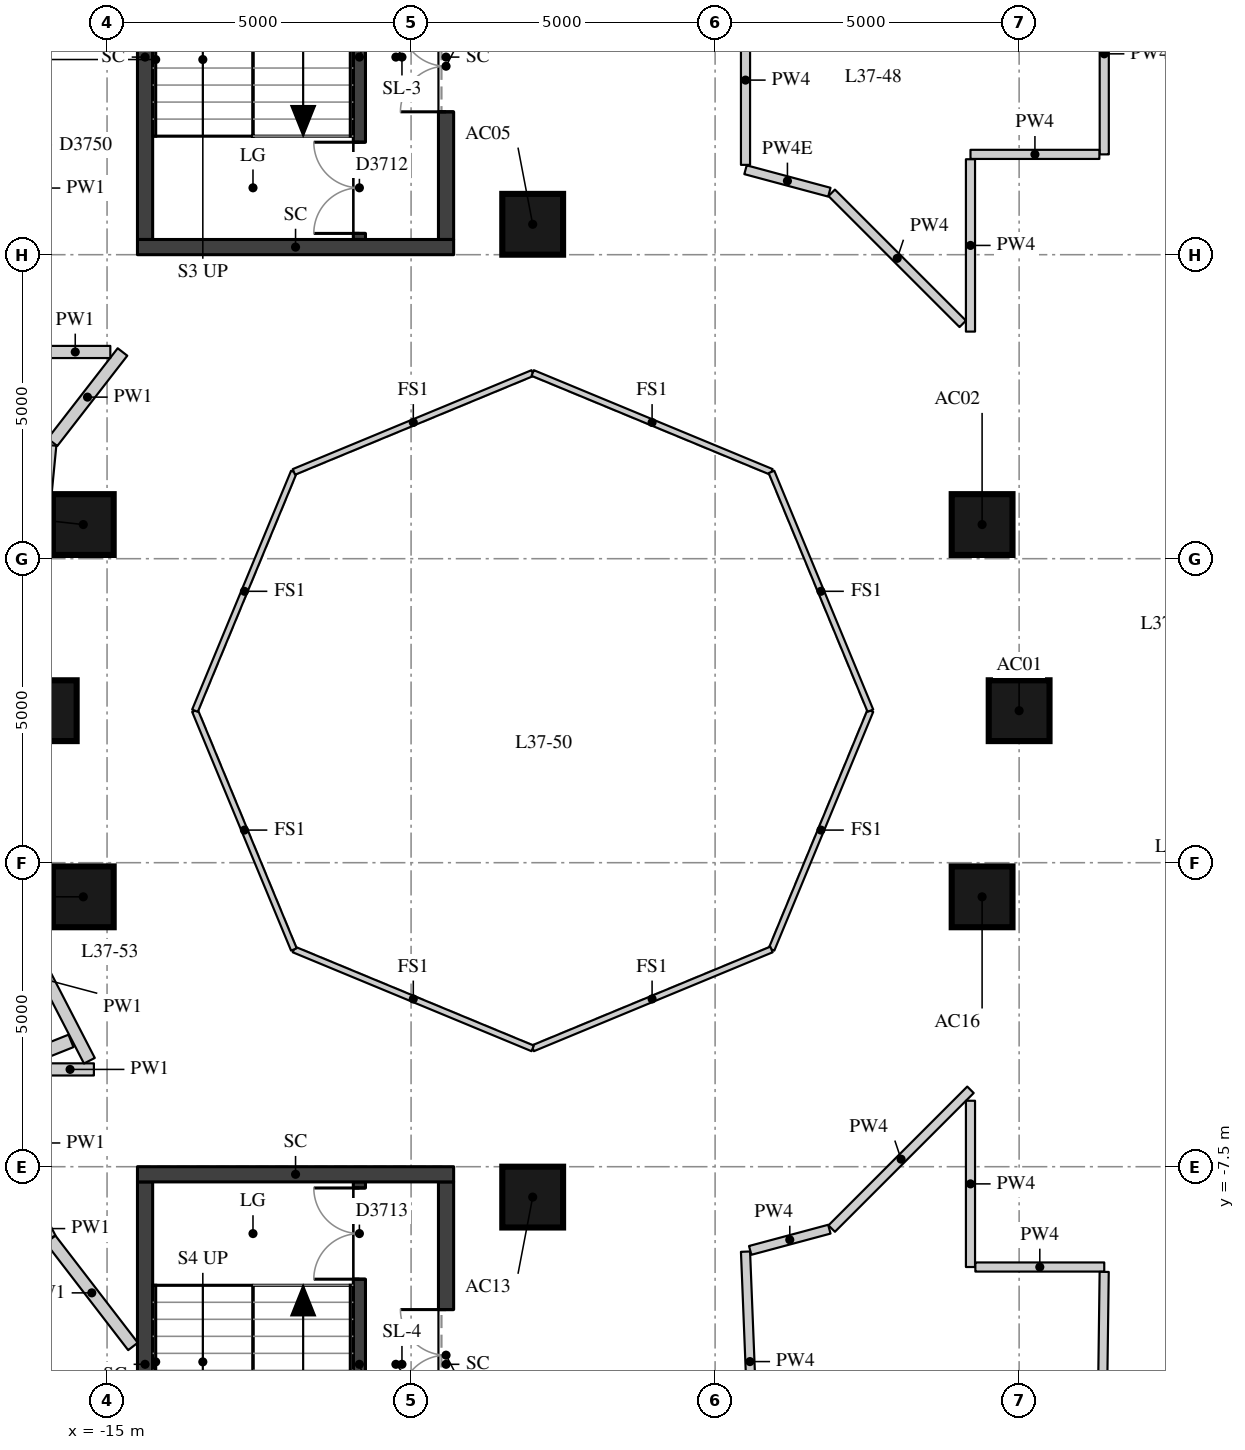
"""IFC4 building model, lengths in metres.
Left out: names, types, materials, properties, quantities, classifications, styles, units other than length and angle.
Written with IfcOpenShell. Run it as: python <this file> out.ifc"""

import sys

from ifc_helpers import new_model, si_unit, direction, frame, frame_2d, origin, origin_2d, place, context, subcontext, project, spatial, rectangle, extrude, element, fill, save


model = new_model("IFC4")
c1 = context("Model", 3, precision=1e-05, world=origin(), true_north=direction((0.0, 1.0)))
c2 = subcontext(c1, "Body", "Model", "MODEL_VIEW")
j1 = project(units=[si_unit("LENGTHUNIT", "METRE"), si_unit("PLANEANGLEUNIT", "RADIAN")], contexts=[c1])
p1 = place(None, origin())
s1 = spatial("IfcSite", under=j1, at=p1, CompositionType="ELEMENT")
p2 = place(p1, origin())
s2 = spatial("IfcBuilding", under=s1, at=p2, CompositionType="ELEMENT")
p3 = place(p2, frame((0.0, 0.0, 131.8)))
s3 = spatial("IfcBuildingStorey", under=s2, at=p3, CompositionType="ELEMENT", Elevation=131.8)
for number, where, z_axis, x_axis in (
    (1, (0.0, 0.0, 0.0), (0.0, 0.0, 1.0), (1.0, 0.0, 0.0)),
    (2, (-0.609, 3.062, 0.0), (0.0, 0.0, 1.0), (1.0, 0.0, 0.0)),
    (3, (-8.0, 8.0, 0.0), (0.0, 0.0, 1.0), (1.0, 0.0, 0.0)),
    (4, (-15.391, 3.062, 0.0), (0.0, 0.0, 1.0), (1.0, 0.0, 0.0)),
    (5, (-16.0, 0.0, 0.0), (0.0, 0.0, 1.0), (1.0, 0.0, 0.0)),
    (6, (-15.391, -3.062, 0.0), (0.0, 0.0, 1.0), (1.0, 0.0, 0.0)),
    (7, (-8.0, -8.0, 0.0), (0.0, 0.0, 1.0), (1.0, 0.0, 0.0)),
    (8, (-0.609, -3.062, 0.0), (0.0, 0.0, 1.0), (1.0, 0.0, 0.0)),
):
    element("IfcColumn", number, at=place(p3, frame(where, z_axis=z_axis, x_axis=x_axis)), inside=s3, PredefinedType="COLUMN", context=c2, shape_type="SweptSolid", body=[
        extrude(rectangle(XDim=1.0, YDim=1.0, at=origin_2d()), origin(), (0.0, 0.0, 1.0), 3.3),
    ])
p4 = place(p3, frame((-10.85, 7.75, 0.0), z_axis=(0.0, 0.0, 1.0), x_axis=(0.0, 1.0, 0.0)))
e9 = element("IfcWall", 9, at=p4, inside=s3, PredefinedType="SHEAR", context=c2, shape_type="SweptSolid", body=[
    extrude(rectangle(XDim=6.0, YDim=0.2, at=frame_2d((3.0, 0.0))), origin(), (0.0, 0.0, 1.0), 2.85),
])
p5 = place(p4, frame((0.1, 0.0, 0.0)))
e10 = element("IfcOpeningElement", 10, at=p5, cuts=e9, PredefinedType="OPENING", context=c2, shape_type="SweptSolid", body=[
    extrude(rectangle(XDim=1.5, YDim=2.1, at=frame_2d((0.75, 1.05))), frame((0.0, 0.11, 0.0), z_axis=(0.0, -1.0, 0.0), x_axis=(1.0, 0.0, 0.0)), (0.0, 0.0, 1.0), 0.22),
])
p6 = place(p3, frame((-10.85, -13.75, 0.0), z_axis=(0.0, 0.0, 1.0), x_axis=(0.0, 1.0, 0.0)))
e11 = element("IfcWall", 11, at=p6, inside=s3, PredefinedType="SHEAR", context=c2, shape_type="SweptSolid", body=[
    extrude(rectangle(XDim=6.0, YDim=0.2, at=frame_2d((3.0, 0.0))), origin(), (0.0, 0.0, 1.0), 2.85),
])
p7 = place(p6, frame((4.4, 0.0, 0.0)))
e12 = element("IfcOpeningElement", 12, at=p7, cuts=e11, PredefinedType="OPENING", context=c2, shape_type="SweptSolid", body=[
    extrude(rectangle(XDim=1.5, YDim=2.1, at=frame_2d((0.75, 1.05))), frame((0.0, 0.11, 0.0), z_axis=(0.0, -1.0, 0.0), x_axis=(1.0, 0.0, 0.0)), (0.0, 0.0, 1.0), 0.22),
])
p8 = place(p3, frame((-14.375, 7.75, -0.28), z_axis=(0.0, 0.0, 1.0), x_axis=(0.0, 1.0, 0.0)))
e13 = element("IfcWall", 13, at=p8, inside=s3, PredefinedType="SHEAR", context=c2, shape_type="SweptSolid", body=[
    extrude(rectangle(XDim=6.0, YDim=0.25, at=frame_2d((3.0, 0.0))), origin(), (0.0, 0.0, 1.0), 3.13),
])
p9 = place(p3, frame((-9.425, 7.75, -0.28), z_axis=(0.0, 0.0, 1.0), x_axis=(0.0, 1.0, 0.0)))
e14 = element("IfcWall", 14, at=p9, inside=s3, PredefinedType="SHEAR", context=c2, shape_type="SweptSolid", body=[
    extrude(rectangle(XDim=6.0, YDim=0.25, at=frame_2d((3.0, 0.0))), origin(), (0.0, 0.0, 1.0), 3.13),
])
p10 = place(p9, frame((2.1, 0.0, 0.28)))
e15 = element("IfcOpeningElement", 15, at=p10, cuts=e14, PredefinedType="OPENING", context=c2, shape_type="SweptSolid", body=[
    extrude(rectangle(XDim=1.5, YDim=2.1, at=frame_2d((0.75, 1.05))), frame((0.0, 0.135, 0.0), z_axis=(0.0, -1.0, 0.0), x_axis=(1.0, 0.0, 0.0)), (0.0, 0.0, 1.0), 0.27),
])
p11 = place(p3, frame((-14.5, 7.625, -0.28), z_axis=(0.0, 0.0, 1.0), x_axis=(1.0, 0.0, 0.0)))
e16 = element("IfcWall", 16, at=p11, inside=s3, PredefinedType="SHEAR", context=c2, shape_type="SweptSolid", body=[
    extrude(rectangle(XDim=5.2, YDim=0.25, at=frame_2d((2.6, 0.0))), origin(), (0.0, 0.0, 1.0), 3.13),
])
p12 = place(p3, frame((-14.375, -13.75, -0.28), z_axis=(0.0, 0.0, 1.0), x_axis=(0.0, 1.0, 0.0)))
e17 = element("IfcWall", 17, at=p12, inside=s3, PredefinedType="SHEAR", context=c2, shape_type="SweptSolid", body=[
    extrude(rectangle(XDim=6.0, YDim=0.25, at=frame_2d((3.0, 0.0))), origin(), (0.0, 0.0, 1.0), 3.13),
])
p13 = place(p3, frame((-9.425, -13.75, -0.28), z_axis=(0.0, 0.0, 1.0), x_axis=(0.0, 1.0, 0.0)))
e18 = element("IfcWall", 18, at=p13, inside=s3, PredefinedType="SHEAR", context=c2, shape_type="SweptSolid", body=[
    extrude(rectangle(XDim=6.0, YDim=0.25, at=frame_2d((3.0, 0.0))), origin(), (0.0, 0.0, 1.0), 3.13),
])
p14 = place(p13, frame((2.4, 0.0, 0.28)))
e19 = element("IfcOpeningElement", 19, at=p14, cuts=e18, PredefinedType="OPENING", context=c2, shape_type="SweptSolid", body=[
    extrude(rectangle(XDim=1.5, YDim=2.1, at=frame_2d((0.75, 1.05))), frame((0.0, 0.135, 0.0), z_axis=(0.0, -1.0, 0.0), x_axis=(1.0, 0.0, 0.0)), (0.0, 0.0, 1.0), 0.27),
])
p15 = place(p3, frame((-14.5, -7.625, -0.28), z_axis=(0.0, 0.0, 1.0), x_axis=(1.0, 0.0, 0.0)))
e20 = element("IfcWall", 20, at=p15, inside=s3, PredefinedType="SHEAR", context=c2, shape_type="SweptSolid", body=[
    extrude(rectangle(XDim=5.2, YDim=0.25, at=frame_2d((2.6, 0.0))), origin(), (0.0, 0.0, 1.0), 3.13),
])
p16 = place(p3, frame((-14.573, -10.456, 0.0), z_axis=(0.0, 0.0, 1.0), x_axis=(-0.60967360535, 0.792652568872, 0.0)))
e21 = element("IfcWall", 21, at=p16, inside=s3, PredefinedType="PARTITIONING", context=c2, shape_type="SweptSolid", body=[
    extrude(rectangle(XDim=2.223, YDim=0.2, at=frame_2d((1.111, 0.0))), origin(), (0.0, 0.0, 1.0), 2.85),
])
p17 = place(p3, frame((-15.938, -8.676, 0.0), z_axis=(0.0, 0.0, 1.0), x_axis=(-0.456525695549, 0.889710227717, 0.0)))
e22 = element("IfcWall", 22, at=p17, inside=s3, PredefinedType="PARTITIONING", context=c2, shape_type="SweptSolid", body=[
    extrude(rectangle(XDim=0.356, YDim=0.2, at=frame_2d((0.178, 0.0))), origin(), (0.0, 0.0, 1.0), 2.85),
])
p18 = place(p3, frame((-16.0, -5.9, 0.0), z_axis=(0.0, 0.0, 1.0), x_axis=(1.0, 0.0, 0.0)))
e23 = element("IfcWall", 23, at=p18, inside=s3, PredefinedType="PARTITIONING", context=c2, shape_type="SweptSolid", body=[
    extrude(rectangle(XDim=0.784, YDim=0.2, at=frame_2d((0.392, 0.0))), origin(), (0.0, 0.0, 1.0), 2.85),
])
p19 = place(p3, frame((-15.291, -5.757, 0.0), z_axis=(0.0, 0.0, 1.0), x_axis=(-0.45873256191, 0.888574384418, 0.0)))
e24 = element("IfcWall", 24, at=p19, inside=s3, PredefinedType="PARTITIONING", context=c2, shape_type="SweptSolid", body=[
    extrude(rectangle(XDim=2.983, YDim=0.2, at=frame_2d((1.491, 0.0))), origin(), (0.0, 0.0, 1.0), 2.85),
])
p20 = place(p3, frame((-16.653, -3.047, 0.0), z_axis=(0.0, 0.0, 1.0), x_axis=(0.096559879606, 0.995327177189, 0.0)))
e25 = element("IfcWall", 25, at=p20, inside=s3, PredefinedType="PARTITIONING", context=c2, shape_type="SweptSolid", body=[
    extrude(rectangle(XDim=7.449, YDim=0.2, at=frame_2d((3.724, 0.0))), origin(), (0.0, 0.0, 1.0), 2.35),
])
p21 = place(p20, frame((0.864, 0.0, 0.0)))
e26 = element("IfcOpeningElement", 26, at=p21, cuts=e25, PredefinedType="OPENING", context=c2, shape_type="SweptSolid", body=[
    extrude(rectangle(XDim=1.1, YDim=2.1, at=frame_2d((0.55, 1.05))), frame((0.0, 0.11, 0.0), z_axis=(0.0, -1.0, 0.0), x_axis=(1.0, 0.0, 0.0)), (0.0, 0.0, 1.0), 0.22),
])
p22 = place(p3, frame((-15.897, 4.415, 0.0), z_axis=(0.0, 0.0, 1.0), x_axis=(0.612626457361, 0.790372585393, 0.0)))
e27 = element("IfcWall", 27, at=p22, inside=s3, PredefinedType="PARTITIONING", context=c2, shape_type="SweptSolid", body=[
    extrude(rectangle(XDim=1.879, YDim=0.2, at=frame_2d((0.939, 0.0))), origin(), (0.0, 0.0, 1.0), 2.85),
])
p23 = place(p3, frame((-14.946, 5.9, 0.0), z_axis=(0.0, 0.0, 1.0), x_axis=(-1.0, 0.0, 0.0)))
e28 = element("IfcWall", 28, at=p23, inside=s3, PredefinedType="PARTITIONING", context=c2, shape_type="SweptSolid", body=[
    extrude(rectangle(XDim=1.154, YDim=0.2, at=frame_2d((0.577, 0.0))), origin(), (0.0, 0.0, 1.0), 2.85),
])
p24 = place(p3, frame((1.4, 12.457, 0.0), z_axis=(0.0, 0.0, 1.0), x_axis=(0.0, -1.0, 0.0)))
e29 = element("IfcWall", 29, at=p24, inside=s3, PredefinedType="PARTITIONING", context=c2, shape_type="SweptSolid", body=[
    extrude(rectangle(XDim=3.307, YDim=0.15, at=frame_2d((1.654, 0.0))), origin(), (0.0, 0.0, 1.0), 2.85),
])
p25 = place(p3, frame((1.32, 9.15, 0.0), z_axis=(0.0, 0.0, 1.0), x_axis=(-1.0, 0.0, 0.0)))
e30 = element("IfcWall", 30, at=p25, inside=s3, PredefinedType="PARTITIONING", context=c2, shape_type="SweptSolid", body=[
    extrude(rectangle(XDim=2.12, YDim=0.15, at=frame_2d((1.06, 0.0))), origin(), (0.0, 0.0, 1.0), 2.85),
])
p26 = place(p3, frame((-0.8, 9.07, 0.0), z_axis=(0.0, 0.0, 1.0), x_axis=(0.0, -1.0, 0.0)))
e31 = element("IfcWall", 31, at=p26, inside=s3, PredefinedType="PARTITIONING", context=c2, shape_type="SweptSolid", body=[
    extrude(rectangle(XDim=2.835, YDim=0.15, at=frame_2d((1.417, 0.0))), origin(), (0.0, 0.0, 1.0), 2.85),
])
p27 = place(p3, frame((-0.927, 6.363, 0.0), z_axis=(0.0, 0.0, 1.0), x_axis=(-0.707106781187, 0.707106781187, 0.0)))
e32 = element("IfcWall", 32, at=p27, inside=s3, PredefinedType="PARTITIONING", context=c2, shape_type="SweptSolid", body=[
    extrude(rectangle(XDim=3.048, YDim=0.15, at=frame_2d((1.524, 0.0))), origin(), (0.0, 0.0, 1.0), 2.85),
])
p28 = place(p3, frame((-3.121, 8.528, 0.0), z_axis=(0.0, 0.0, 1.0), x_axis=(-0.965941945062, 0.258758881529, 0.0)))
e33 = element("IfcWall", 33, at=p28, inside=s3, PredefinedType="PARTITIONING", context=c2, shape_type="SweptSolid", body=[
    extrude(rectangle(XDim=1.427, YDim=0.15, at=frame_2d((0.714, 0.0))), origin(), (0.0, 0.0, 1.0), 2.3),
])
p29 = place(p3, frame((-4.5, 8.977, 0.0), z_axis=(0.0, 0.0, 1.0), x_axis=(0.0, 1.0, 0.0)))
e34 = element("IfcWall", 34, at=p29, inside=s3, PredefinedType="PARTITIONING", context=c2, shape_type="SweptSolid", body=[
    extrude(rectangle(XDim=2.789, YDim=0.15, at=frame_2d((1.394, 0.0))), origin(), (0.0, 0.0, 1.0), 2.85),
])
p30 = place(p3, frame((-3.083, -8.518, 0.0), z_axis=(0.0, 0.0, 1.0), x_axis=(0.707106781187, 0.707106781187, 0.0)))
e35 = element("IfcWall", 35, at=p30, inside=s3, PredefinedType="PARTITIONING", context=c2, shape_type="SweptSolid", body=[
    extrude(rectangle(XDim=3.228, YDim=0.15, at=frame_2d((1.614, 0.0))), origin(), (0.0, 0.0, 1.0), 2.85),
])
p31 = place(p3, frame((-0.8, -6.415, 0.0), z_axis=(0.0, 0.0, 1.0), x_axis=(0.0, -1.0, 0.0)))
e36 = element("IfcWall", 36, at=p31, inside=s3, PredefinedType="PARTITIONING", context=c2, shape_type="SweptSolid", body=[
    extrude(rectangle(XDim=2.735, YDim=0.15, at=frame_2d((1.367, 0.0))), origin(), (0.0, 0.0, 1.0), 2.85),
])
p32 = place(p3, frame((-0.72, -9.15, 0.0), z_axis=(0.0, 0.0, 1.0), x_axis=(1.0, 0.0, 0.0)))
e37 = element("IfcWall", 37, at=p32, inside=s3, PredefinedType="PARTITIONING", context=c2, shape_type="SweptSolid", body=[
    extrude(rectangle(XDim=2.12, YDim=0.15, at=frame_2d((1.06, 0.0))), origin(), (0.0, 0.0, 1.0), 2.85),
])
p33 = place(p3, frame((1.399, -9.23, 0.0), z_axis=(0.0, 0.0, 1.0), x_axis=(-0.013008669764, -0.999915383676, 0.0)))
e38 = element("IfcWall", 38, at=p33, inside=s3, PredefinedType="PARTITIONING", context=c2, shape_type="SweptSolid", body=[
    extrude(rectangle(XDim=4.598, YDim=0.15, at=frame_2d((2.299, 0.0))), origin(), (0.0, 0.0, 1.0), 2.85),
])
p34 = place(p33, frame((1.849, 0.0, 0.0)))
e39 = element("IfcOpeningElement", 39, at=p34, cuts=e38, PredefinedType="OPENING", context=c2, shape_type="SweptSolid", body=[
    extrude(rectangle(XDim=0.9, YDim=2.1, at=frame_2d((0.45, 1.05))), frame((0.0, 0.085, 0.0), z_axis=(0.0, -1.0, 0.0), x_axis=(1.0, 0.0, 0.0)), (0.0, 0.0, 1.0), 0.17),
])
p35 = place(p3, frame((-4.355, -12.513, 0.0), z_axis=(0.0, 0.0, 1.0), x_axis=(-0.040070411422, 0.999196858546, 0.0)))
e40 = element("IfcWall", 40, at=p35, inside=s3, PredefinedType="PARTITIONING", context=c2, shape_type="SweptSolid", body=[
    extrude(rectangle(XDim=3.619, YDim=0.15, at=frame_2d((1.81, 0.0))), origin(), (0.0, 0.0, 1.0), 2.85),
])
p36 = place(p3, frame((-4.423, -8.877, 0.0), z_axis=(0.0, 0.0, 1.0), x_axis=(0.965912469164, 0.258868889429, 0.0)))
e41 = element("IfcWall", 41, at=p36, inside=s3, PredefinedType="PARTITIONING", context=c2, shape_type="SweptSolid", body=[
    extrude(rectangle(XDim=1.348, YDim=0.15, at=frame_2d((0.674, 0.0))), origin(), (0.0, 0.0, 1.0), 2.85),
])
p37 = place(p3, frame((-21.736, -7.887, 0.0), z_axis=(0.0, 0.0, 1.0), x_axis=(0.928547942842, 0.371212496884, 0.0)))
e42 = element("IfcWall", 42, at=p37, inside=s3, PredefinedType="PARTITIONING", context=c2, shape_type="SweptSolid", body=[
    extrude(rectangle(XDim=6.615, YDim=0.22, at=frame_2d((3.308, 0.0))), origin(), (0.0, 0.0, 1.0), 2.85),
])
for number, where, z_axis, x_axis in (
    (43, (-2.446, 0.0, 0.0), (0.0, 0.0, 1.0), (-0.383, -0.924, 0.0)),
    (44, (-4.073, -3.927, 0.0), (0.0, 0.0, 1.0), (-0.924, -0.383, 0.0)),
    (45, (-8.0, -5.554, 0.0), (0.0, 0.0, 1.0), (-0.924, 0.383, 0.0)),
    (46, (-11.927, -3.927, 0.0), (0.0, 0.0, 1.0), (-0.383, 0.924, 0.0)),
    (47, (-13.554, 0.0, 0.0), (0.0, 0.0, 1.0), (0.383, 0.924, 0.0)),
    (48, (-11.927, 3.927, 0.0), (0.0, 0.0, 1.0), (0.924, 0.383, 0.0)),
    (49, (-8.0, 5.554, 0.0), (0.0, 0.0, 1.0), (0.924, -0.383, 0.0)),
    (50, (-4.073, 3.927, 0.0), (0.0, 0.0, 1.0), (0.383, -0.924, 0.0)),
):
    element("IfcWall", number, at=place(p3, frame(where, z_axis=z_axis, x_axis=x_axis)), inside=s3, PredefinedType="PARTITIONING", context=c2, shape_type="SweptSolid", body=[
        extrude(rectangle(XDim=4.251, YDim=0.1, at=frame_2d((2.125, 0.0))), origin(), (0.0, 0.0, 1.0), 2.85),
    ])
p38 = place(p5, origin())
e51 = element("IfcDoor", 51, at=p38, inside=s3, OperationType="DOUBLE_DOOR_SINGLE_SWING", PredefinedType="DOOR", context=c2, shape_type="SweptSolid", body=[
    extrude(rectangle(XDim=1.5, YDim=2.1, at=frame_2d((0.75, 1.05))), frame((0.0, 0.025, 0.0), z_axis=(0.0, -1.0, 0.0), x_axis=(1.0, 0.0, 0.0)), (0.0, 0.0, 1.0), 0.05),
])
fill(e10, e51)
p39 = place(p7, origin())
e52 = element("IfcDoor", 52, at=p39, inside=s3, OperationType="DOUBLE_DOOR_SINGLE_SWING", PredefinedType="DOOR", context=c2, shape_type="SweptSolid", body=[
    extrude(rectangle(XDim=1.5, YDim=2.1, at=frame_2d((0.75, 1.05))), frame((0.0, 0.025, 0.0), z_axis=(0.0, -1.0, 0.0), x_axis=(1.0, 0.0, 0.0)), (0.0, 0.0, 1.0), 0.05),
])
fill(e12, e52)
p40 = place(p10, origin())
e53 = element("IfcDoor", 53, at=p40, inside=s3, OperationType="DOUBLE_DOOR_SINGLE_SWING", PredefinedType="DOOR", context=c2, shape_type="SweptSolid", body=[
    extrude(rectangle(XDim=1.5, YDim=2.1, at=frame_2d((0.75, 1.05))), frame((0.0, 0.025, 0.0), z_axis=(0.0, -1.0, 0.0), x_axis=(1.0, 0.0, 0.0)), (0.0, 0.0, 1.0), 0.05),
])
fill(e15, e53)
p41 = place(p14, origin())
e54 = element("IfcDoor", 54, at=p41, inside=s3, OperationType="DOUBLE_DOOR_SINGLE_SWING", PredefinedType="DOOR", context=c2, shape_type="SweptSolid", body=[
    extrude(rectangle(XDim=1.5, YDim=2.1, at=frame_2d((0.75, 1.05))), frame((0.0, 0.025, 0.0), z_axis=(0.0, -1.0, 0.0), x_axis=(1.0, 0.0, 0.0)), (0.0, 0.0, 1.0), 0.05),
])
fill(e19, e54)
save(model, sys.argv[1])
